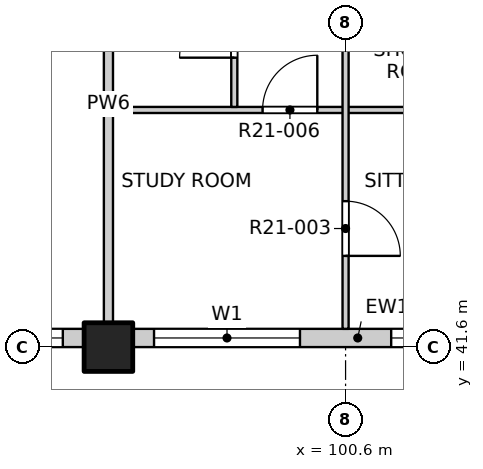
"""IFC4 building model, lengths in metres.
Left out: names, types, materials, properties, quantities, classifications, styles, units other than length and angle.
Written with IfcOpenShell. Run it as: python <this file> out.ifc"""

import sys

from ifc_helpers import new_model, si_unit, direction, frame, frame_2d, origin, origin_2d, place, context, subcontext, project, spatial, rectangle, extrude, element, fill, save


model = new_model("IFC4")
c1 = context("Model", 3, precision=1e-05, world=origin(), true_north=direction((0.0, 1.0)))
c2 = subcontext(c1, "Body", "Model", "MODEL_VIEW")
j1 = project(units=[si_unit("LENGTHUNIT", "METRE"), si_unit("PLANEANGLEUNIT", "RADIAN")], contexts=[c1])
p1 = place(None, origin())
s1 = spatial("IfcSite", under=j1, at=p1, CompositionType="ELEMENT")
p2 = place(p1, origin())
s2 = spatial("IfcBuilding", under=s1, at=p2, CompositionType="ELEMENT")
p3 = place(p2, frame((0.0, 0.0, 221.1)))
s3 = spatial("IfcBuildingStorey", under=s2, at=p3, CompositionType="ELEMENT", Elevation=221.1)
p4 = place(p3, frame((96.7, 41.6, -0.25), z_axis=(0.0, 0.0, 1.0), x_axis=(1.0, 0.0, 0.0)))
e1 = element("IfcColumn", 1, at=p4, inside=s3, PredefinedType="COLUMN", context=c2, shape_type="SweptSolid", body=[
    extrude(rectangle(XDim=0.8, YDim=0.8, at=origin_2d()), origin(), (0.0, 0.0, 1.0), 3.4),
])
p5 = place(p3, frame((89.3, 41.75, 0.0), z_axis=(0.0, 0.0, 1.0), x_axis=(1.0, 0.0, 0.0)))
e2 = element("IfcWall", 2, at=p5, inside=s3, PredefinedType="SOLIDWALL", context=c2, shape_type="SweptSolid", body=[
    extrude(rectangle(XDim=7.0, YDim=0.3, at=frame_2d((3.5, 0.0))), origin(), (0.0, 0.0, 1.0), 2.7),
])
p6 = place(p5, frame((0.35, 0.0, 0.9)))
e3 = element("IfcOpeningElement", 3, at=p6, cuts=e2, PredefinedType="OPENING", context=c2, shape_type="SweptSolid", body=[
    extrude(rectangle(XDim=2.4, YDim=1.8, at=frame_2d((1.2, 0.9))), frame((0.0, 0.16, 0.0), z_axis=(0.0, -1.0, 0.0), x_axis=(1.0, 0.0, 0.0)), (0.0, 0.0, 1.0), 0.32),
])
p7 = place(p5, frame((4.25, 0.0, 0.9)))
e4 = element("IfcOpeningElement", 4, at=p7, cuts=e2, PredefinedType="OPENING", context=c2, shape_type="SweptSolid", body=[
    extrude(rectangle(XDim=2.4, YDim=1.8, at=frame_2d((1.2, 0.9))), frame((0.0, 0.16, 0.0), z_axis=(0.0, -1.0, 0.0), x_axis=(1.0, 0.0, 0.0)), (0.0, 0.0, 1.0), 0.32),
])
p8 = place(p3, frame((97.1, 41.75, 0.0), z_axis=(0.0, 0.0, 1.0), x_axis=(1.0, 0.0, 0.0)))
e5 = element("IfcWall", 5, at=p8, inside=s3, PredefinedType="SOLIDWALL", context=c2, shape_type="SweptSolid", body=[
    extrude(rectangle(XDim=7.4, YDim=0.3, at=frame_2d((3.7, 0.0))), origin(), (0.0, 0.0, 1.0), 2.7),
])
p9 = place(p8, frame((0.35, 0.0, 0.9)))
e6 = element("IfcOpeningElement", 6, at=p9, cuts=e5, PredefinedType="OPENING", context=c2, shape_type="SweptSolid", body=[
    extrude(rectangle(XDim=2.4, YDim=1.8, at=frame_2d((1.2, 0.9))), frame((0.0, 0.16, 0.0), z_axis=(0.0, -1.0, 0.0), x_axis=(1.0, 0.0, 0.0)), (0.0, 0.0, 1.0), 0.32),
])
p10 = place(p8, frame((4.25, 0.0, 0.9)))
e7 = element("IfcOpeningElement", 7, at=p10, cuts=e5, PredefinedType="OPENING", context=c2, shape_type="SweptSolid", body=[
    extrude(rectangle(XDim=2.4, YDim=1.8, at=frame_2d((1.2, 0.9))), frame((0.0, 0.16, 0.0), z_axis=(0.0, -1.0, 0.0), x_axis=(1.0, 0.0, 0.0)), (0.0, 0.0, 1.0), 0.32),
])
p11 = place(p3, frame((96.625, 45.5, 0.0), z_axis=(0.0, 0.0, 1.0), x_axis=(1.0, 0.0, 0.0)))
e8 = element("IfcWall", 8, at=p11, inside=s3, PredefinedType="PARTITIONING", context=c2, shape_type="SweptSolid", body=[
    extrude(rectangle(XDim=11.475, YDim=0.1, at=frame_2d((5.738, 0.0))), origin(), (0.0, 0.0, 1.0), 3.15),
])
p12 = place(p11, frame((2.61, 0.0, 0.0)))
e9 = element("IfcOpeningElement", 9, at=p12, cuts=e8, PredefinedType="OPENING", context=c2, shape_type="SweptSolid", body=[
    extrude(rectangle(XDim=0.9, YDim=2.1, at=frame_2d((0.45, 1.05))), frame((0.0, 0.06, 0.0), z_axis=(0.0, -1.0, 0.0), x_axis=(1.0, 0.0, 0.0)), (0.0, 0.0, 1.0), 0.12),
])
p13 = place(p3, frame((96.7, 41.9, 0.0), z_axis=(0.0, 0.0, 1.0), x_axis=(0.0, 1.0, 0.0)))
e10 = element("IfcWall", 10, at=p13, inside=s3, PredefinedType="PARTITIONING", context=c2, shape_type="SweptSolid", body=[
    extrude(rectangle(XDim=7.4, YDim=0.15, at=frame_2d((3.7, 0.0))), origin(), (0.0, 0.0, 1.0), 3.15),
])
p14 = place(p3, frame((98.77, 45.55, 0.0), z_axis=(0.0, 0.0, 1.0), x_axis=(0.0, 1.0, 0.0)))
e11 = element("IfcWall", 11, at=p14, inside=s3, PredefinedType="PARTITIONING", context=c2, shape_type="SweptSolid", body=[
    extrude(rectangle(XDim=8.35, YDim=0.1, at=frame_2d((4.175, 0.0))), origin(), (0.0, 0.0, 1.0), 3.15),
])
p15 = place(p14, frame((0.81, 0.0, 0.0)))
e12 = element("IfcOpeningElement", 12, at=p15, cuts=e11, PredefinedType="OPENING", context=c2, shape_type="SweptSolid", body=[
    extrude(rectangle(XDim=0.9, YDim=2.1, at=frame_2d((0.45, 1.05))), frame((0.0, 0.06, 0.0), z_axis=(0.0, -1.0, 0.0), x_axis=(1.0, 0.0, 0.0)), (0.0, 0.0, 1.0), 0.12),
])
p16 = place(p14, frame((3.21, 0.0, 0.0)))
e13 = element("IfcOpeningElement", 13, at=p16, cuts=e11, PredefinedType="OPENING", context=c2, shape_type="SweptSolid", body=[
    extrude(rectangle(XDim=0.8, YDim=2.1, at=frame_2d((0.4, 1.05))), frame((0.0, 0.06, 0.0), z_axis=(0.0, -1.0, 0.0), x_axis=(1.0, 0.0, 0.0)), (0.0, 0.0, 1.0), 0.12),
])
p17 = place(p14, frame((5.1, 0.0, 0.0)))
e14 = element("IfcOpeningElement", 14, at=p17, cuts=e11, PredefinedType="OPENING", context=c2, shape_type="SweptSolid", body=[
    extrude(rectangle(XDim=0.9, YDim=2.1, at=frame_2d((0.45, 1.05))), frame((0.0, 0.06, 0.0), z_axis=(0.0, -1.0, 0.0), x_axis=(1.0, 0.0, 0.0)), (0.0, 0.0, 1.0), 0.12),
])
p18 = place(p14, frame((6.975, 0.0, 0.0)))
e15 = element("IfcOpeningElement", 15, at=p18, cuts=e11, PredefinedType="OPENING", context=c2, shape_type="SweptSolid", body=[
    extrude(rectangle(XDim=0.9, YDim=2.1, at=frame_2d((0.45, 1.05))), frame((0.0, 0.06, 0.0), z_axis=(0.0, -1.0, 0.0), x_axis=(1.0, 0.0, 0.0)), (0.0, 0.0, 1.0), 0.12),
])
p19 = place(p3, frame((100.6, 41.9, 0.0), z_axis=(0.0, 0.0, 1.0), x_axis=(0.0, 1.0, 0.0)))
e16 = element("IfcWall", 16, at=p19, inside=s3, PredefinedType="PARTITIONING", context=c2, shape_type="SweptSolid", body=[
    extrude(rectangle(XDim=46.2, YDim=0.1, at=frame_2d((23.1, 0.0))), origin(), (0.0, 0.0, 1.0), 3.15),
])
p20 = place(p19, frame((1.2, 0.0, 0.0)))
e17 = element("IfcOpeningElement", 17, at=p20, cuts=e16, PredefinedType="OPENING", context=c2, shape_type="SweptSolid", body=[
    extrude(rectangle(XDim=0.9, YDim=2.1, at=frame_2d((0.45, 1.05))), frame((0.0, 0.06, 0.0), z_axis=(0.0, -1.0, 0.0), x_axis=(1.0, 0.0, 0.0)), (0.0, 0.0, 1.0), 0.12),
])
p21 = place(p19, frame((6.025, 0.0, 0.0)))
e18 = element("IfcOpeningElement", 18, at=p21, cuts=e16, PredefinedType="OPENING", context=c2, shape_type="SweptSolid", body=[
    extrude(rectangle(XDim=0.9, YDim=2.1, at=frame_2d((0.45, 1.05))), frame((0.0, 0.06, 0.0), z_axis=(0.0, -1.0, 0.0), x_axis=(1.0, 0.0, 0.0)), (0.0, 0.0, 1.0), 0.12),
])
p22 = place(p19, frame((9.0, 0.0, 0.0)))
e19 = element("IfcOpeningElement", 19, at=p22, cuts=e16, PredefinedType="OPENING", context=c2, shape_type="SweptSolid", body=[
    extrude(rectangle(XDim=0.9, YDim=2.1, at=frame_2d((0.45, 1.05))), frame((0.0, 0.06, 0.0), z_axis=(0.0, -1.0, 0.0), x_axis=(1.0, 0.0, 0.0)), (0.0, 0.0, 1.0), 0.12),
])
p23 = place(p19, frame((13.85, 0.0, 0.0)))
e20 = element("IfcOpeningElement", 20, at=p23, cuts=e16, PredefinedType="OPENING", context=c2, shape_type="SweptSolid", body=[
    extrude(rectangle(XDim=0.9, YDim=2.1, at=frame_2d((0.45, 1.05))), frame((0.0, 0.06, 0.0), z_axis=(0.0, -1.0, 0.0), x_axis=(1.0, 0.0, 0.0)), (0.0, 0.0, 1.0), 0.12),
])
p24 = place(p19, frame((16.8, 0.0, 0.0)))
e21 = element("IfcOpeningElement", 21, at=p24, cuts=e16, PredefinedType="OPENING", context=c2, shape_type="SweptSolid", body=[
    extrude(rectangle(XDim=0.9, YDim=2.1, at=frame_2d((0.45, 1.05))), frame((0.0, 0.06, 0.0), z_axis=(0.0, -1.0, 0.0), x_axis=(1.0, 0.0, 0.0)), (0.0, 0.0, 1.0), 0.12),
])
p25 = place(p19, frame((21.625, 0.0, 0.0)))
e22 = element("IfcOpeningElement", 22, at=p25, cuts=e16, PredefinedType="OPENING", context=c2, shape_type="SweptSolid", body=[
    extrude(rectangle(XDim=0.9, YDim=2.1, at=frame_2d((0.45, 1.05))), frame((0.0, 0.06, 0.0), z_axis=(0.0, -1.0, 0.0), x_axis=(1.0, 0.0, 0.0)), (0.0, 0.0, 1.0), 0.12),
])
p26 = place(p19, frame((24.6, 0.0, 0.0)))
e23 = element("IfcOpeningElement", 23, at=p26, cuts=e16, PredefinedType="OPENING", context=c2, shape_type="SweptSolid", body=[
    extrude(rectangle(XDim=0.9, YDim=2.1, at=frame_2d((0.45, 1.05))), frame((0.0, 0.06, 0.0), z_axis=(0.0, -1.0, 0.0), x_axis=(1.0, 0.0, 0.0)), (0.0, 0.0, 1.0), 0.12),
])
p27 = place(p19, frame((29.425, 0.0, 0.0)))
e24 = element("IfcOpeningElement", 24, at=p27, cuts=e16, PredefinedType="OPENING", context=c2, shape_type="SweptSolid", body=[
    extrude(rectangle(XDim=0.9, YDim=2.1, at=frame_2d((0.45, 1.05))), frame((0.0, 0.06, 0.0), z_axis=(0.0, -1.0, 0.0), x_axis=(1.0, 0.0, 0.0)), (0.0, 0.0, 1.0), 0.12),
])
p28 = place(p19, frame((33.375, 0.0, 0.0)))
e25 = element("IfcOpeningElement", 25, at=p28, cuts=e16, PredefinedType="OPENING", context=c2, shape_type="SweptSolid", body=[
    extrude(rectangle(XDim=0.9, YDim=2.1, at=frame_2d((0.45, 1.05))), frame((0.0, 0.06, 0.0), z_axis=(0.0, -1.0, 0.0), x_axis=(1.0, 0.0, 0.0)), (0.0, 0.0, 1.0), 0.12),
])
p29 = place(p19, frame((36.3, 0.0, 0.0)))
e26 = element("IfcOpeningElement", 26, at=p29, cuts=e16, PredefinedType="OPENING", context=c2, shape_type="SweptSolid", body=[
    extrude(rectangle(XDim=0.9, YDim=2.1, at=frame_2d((0.45, 1.05))), frame((0.0, 0.06, 0.0), z_axis=(0.0, -1.0, 0.0), x_axis=(1.0, 0.0, 0.0)), (0.0, 0.0, 1.0), 0.12),
])
p30 = place(p19, frame((41.175, 0.0, 0.0)))
e27 = element("IfcOpeningElement", 27, at=p30, cuts=e16, PredefinedType="OPENING", context=c2, shape_type="SweptSolid", body=[
    extrude(rectangle(XDim=0.9, YDim=2.1, at=frame_2d((0.45, 1.05))), frame((0.0, 0.06, 0.0), z_axis=(0.0, -1.0, 0.0), x_axis=(1.0, 0.0, 0.0)), (0.0, 0.0, 1.0), 0.12),
])
p31 = place(p19, frame((44.1, 0.0, 0.0)))
e28 = element("IfcOpeningElement", 28, at=p31, cuts=e16, PredefinedType="OPENING", context=c2, shape_type="SweptSolid", body=[
    extrude(rectangle(XDim=0.9, YDim=2.1, at=frame_2d((0.45, 1.05))), frame((0.0, 0.06, 0.0), z_axis=(0.0, -1.0, 0.0), x_axis=(1.0, 0.0, 0.0)), (0.0, 0.0, 1.0), 0.12),
])
p32 = place(p7, origin())
e29 = element("IfcWindow", 29, at=p32, inside=s3, PartitioningType="DOUBLE_PANEL_VERTICAL", PredefinedType="WINDOW", context=c2, shape_type="SweptSolid", body=[
    extrude(rectangle(XDim=2.4, YDim=1.8, at=frame_2d((1.2, 0.9))), frame((0.0, 0.03, 0.0), z_axis=(0.0, -1.0, 0.0), x_axis=(1.0, 0.0, 0.0)), (0.0, 0.0, 1.0), 0.06),
])
fill(e4, e29)
p33 = place(p9, origin())
e30 = element("IfcWindow", 30, at=p33, inside=s3, PartitioningType="DOUBLE_PANEL_VERTICAL", PredefinedType="WINDOW", context=c2, shape_type="SweptSolid", body=[
    extrude(rectangle(XDim=2.4, YDim=1.8, at=frame_2d((1.2, 0.9))), frame((0.0, 0.03, 0.0), z_axis=(0.0, -1.0, 0.0), x_axis=(1.0, 0.0, 0.0)), (0.0, 0.0, 1.0), 0.06),
])
fill(e6, e30)
p34 = place(p10, origin())
e31 = element("IfcWindow", 31, at=p34, inside=s3, PartitioningType="DOUBLE_PANEL_VERTICAL", PredefinedType="WINDOW", context=c2, shape_type="SweptSolid", body=[
    extrude(rectangle(XDim=2.4, YDim=1.8, at=frame_2d((1.2, 0.9))), frame((0.0, 0.03, 0.0), z_axis=(0.0, -1.0, 0.0), x_axis=(1.0, 0.0, 0.0)), (0.0, 0.0, 1.0), 0.06),
])
fill(e7, e31)
p35 = place(p20, origin())
e32 = element("IfcDoor", 32, at=p35, inside=s3, OperationType="SINGLE_SWING_RIGHT", PredefinedType="DOOR", context=c2, shape_type="SweptSolid", body=[
    extrude(rectangle(XDim=0.9, YDim=2.1, at=frame_2d((0.45, 1.05))), frame((0.0, 0.025, 0.0), z_axis=(0.0, -1.0, 0.0), x_axis=(1.0, 0.0, 0.0)), (0.0, 0.0, 1.0), 0.05),
])
fill(e17, e32)
p36 = place(p12, origin())
e33 = element("IfcDoor", 33, at=p36, inside=s3, OperationType="SINGLE_SWING_RIGHT", PredefinedType="DOOR", context=c2, shape_type="SweptSolid", body=[
    extrude(rectangle(XDim=0.9, YDim=2.1, at=frame_2d((0.45, 1.05))), frame((0.0, 0.025, 0.0), z_axis=(0.0, -1.0, 0.0), x_axis=(1.0, 0.0, 0.0)), (0.0, 0.0, 1.0), 0.05),
])
fill(e9, e33)
p37 = place(p15, origin())
e34 = element("IfcDoor", 34, at=p37, inside=s3, OperationType="SINGLE_SWING_LEFT", PredefinedType="DOOR", context=c2, shape_type="SweptSolid", body=[
    extrude(rectangle(XDim=0.9, YDim=2.1, at=frame_2d((0.45, 1.05))), frame((0.0, 0.025, 0.0), z_axis=(0.0, -1.0, 0.0), x_axis=(1.0, 0.0, 0.0)), (0.0, 0.0, 1.0), 0.05),
])
fill(e12, e34)
save(model, sys.argv[1])
